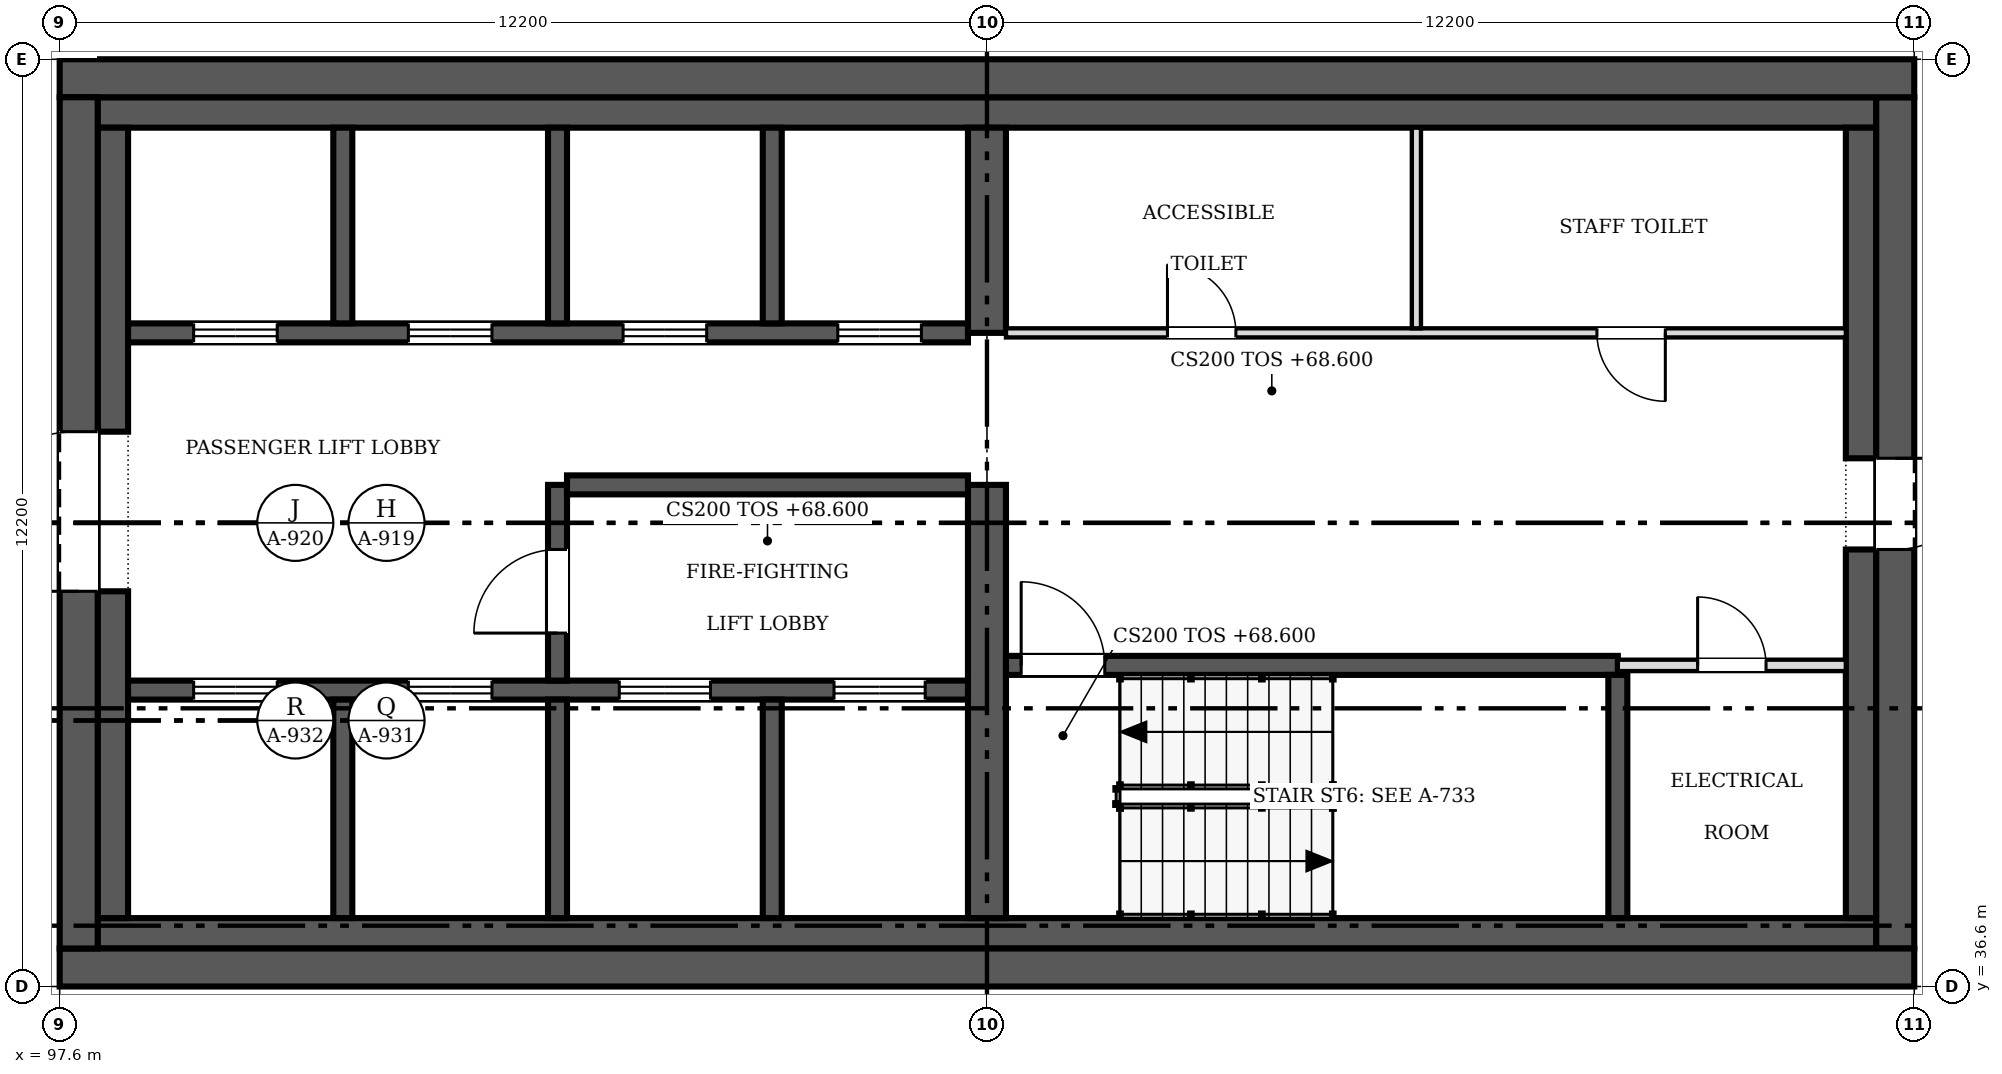
"""IFC4 building model, lengths in metres.
Left out: names, types, materials, properties, quantities, classifications, styles, units other than length and angle.
Written with IfcOpenShell. Run it as: python <this file> out.ifc"""

import sys

from ifc_helpers import new_model, si_unit, direction, frame, frame_2d, origin, place, context, subcontext, project, spatial, rectangle, extrude, source, transform, mapped, element, fill, save


model = new_model("IFC4")
c1 = context("Model", 3, precision=1e-05, world=origin(), true_north=direction((0.0, 1.0)))
c2 = subcontext(c1, "Body", "Model", "MODEL_VIEW")
j1 = project(units=[si_unit("LENGTHUNIT", "METRE"), si_unit("PLANEANGLEUNIT", "RADIAN")], contexts=[c1])
p1 = place(None, origin())
s1 = spatial("IfcSite", under=j1, at=p1, CompositionType="ELEMENT")
p2 = place(p1, origin())
s2 = spatial("IfcBuilding", under=s1, at=p2, CompositionType="ELEMENT")
p3 = place(p2, frame((0.0, 0.0, 68.6)))
s3 = spatial("IfcBuildingStorey", under=s2, at=p3, CompositionType="ELEMENT", Elevation=68.6)
p4 = place(p3, frame((122.0, 36.85, 0.0), z_axis=(0.0, 0.0, 1.0), x_axis=(-1.0, 0.0, 0.0)))
e1 = element("IfcWall", 1, at=p4, inside=s3, PredefinedType="SHEAR", context=c2, shape_type="SweptSolid", body=[
    extrude(rectangle(XDim=24.4, YDim=0.5, at=frame_2d((12.2, 0.0))), origin(), (0.0, 0.0, 1.0), 3.8),
])
p5 = place(p3, frame((97.85, 37.1, 0.0), z_axis=(0.0, 0.0, 1.0), x_axis=(0.0, 1.0, 0.0)))
e2 = element("IfcWall", 2, at=p5, inside=s3, PredefinedType="SHEAR", context=c2, shape_type="SweptSolid", body=[
    extrude(rectangle(XDim=11.2, YDim=0.5, at=frame_2d((5.6, 0.0))), origin(), (0.0, 0.0, 1.0), 3.8),
])
m1 = source(origin(), c2, "Body", "SweptSolid", [
    extrude(rectangle(XDim=2.1, YDim=2.4, at=frame_2d((1.05, 1.2))), frame((0.0, 0.26, 0.0), z_axis=(0.0, -1.0, 0.0), x_axis=(1.0, 0.0, 0.0)), (0.0, 0.0, 1.0), 0.52),
])
p6 = place(p5, frame((4.7, 0.0, 0.0)))
e3 = element("IfcOpeningElement", 3, at=p6, cuts=e2, PredefinedType="OPENING", context=c2, shape_type="MappedRepresentation", body=[
    mapped(m1, transform((0.0, 0.0, 0.0), scale=1.0)),
])
p7 = place(p3, frame((97.6, 48.55, 0.0), z_axis=(0.0, 0.0, 1.0), x_axis=(1.0, 0.0, 0.0)))
e4 = element("IfcWall", 4, at=p7, inside=s3, PredefinedType="SHEAR", context=c2, shape_type="SweptSolid", body=[
    extrude(rectangle(XDim=24.4, YDim=0.5, at=frame_2d((12.2, 0.0))), origin(), (0.0, 0.0, 1.0), 3.8),
])
p8 = place(p3, frame((121.75, 48.3, 0.0), z_axis=(0.0, 0.0, 1.0), x_axis=(0.0, -1.0, 0.0)))
e5 = element("IfcWall", 5, at=p8, inside=s3, PredefinedType="SHEAR", context=c2, shape_type="SweptSolid", body=[
    extrude(rectangle(XDim=11.2, YDim=0.5, at=frame_2d((5.6, 0.0))), origin(), (0.0, 0.0, 1.0), 3.8),
])
m2 = source(origin(), c2, "Body", "SweptSolid", [
    extrude(rectangle(XDim=1.2, YDim=2.1, at=frame_2d((0.6, 1.05))), frame((0.0, 0.26, 0.0), z_axis=(0.0, -1.0, 0.0), x_axis=(1.0, 0.0, 0.0)), (0.0, 0.0, 1.0), 0.52),
])
p9 = place(p8, frame((4.75, 0.0, 0.0)))
e6 = element("IfcOpeningElement", 6, at=p9, cuts=e5, PredefinedType="OPENING", context=c2, shape_type="MappedRepresentation", body=[
    mapped(m2, transform((0.0, 0.0, 0.0), scale=1.0)),
])
for number, where, z_axis, x_axis in (
    (7, (98.1, 37.3, 0.0), (0.0, 0.0, 1.0), (1.0, 0.0, 0.0)),
    (8, (98.1, 48.1, 0.0), (0.0, 0.0, 1.0), (1.0, 0.0, 0.0)),
):
    element("IfcWall", number, at=place(p3, frame(where, z_axis=z_axis, x_axis=x_axis)), inside=s3, PredefinedType="SOLIDWALL", context=c2, shape_type="SweptSolid", body=[
        extrude(rectangle(XDim=23.4, YDim=0.4, at=frame_2d((11.7, 0.0))), origin(), (0.0, 0.0, 1.0), 3.8),
    ])
p10 = place(p3, frame((98.3, 37.5, 0.0), z_axis=(0.0, 0.0, 1.0), x_axis=(0.0, 1.0, 0.0)))
e9 = element("IfcWall", 9, at=p10, inside=s3, PredefinedType="SOLIDWALL", context=c2, shape_type="SweptSolid", body=[
    extrude(rectangle(XDim=4.3, YDim=0.4, at=frame_2d((2.15, 0.0))), origin(), (0.0, 0.0, 1.0), 3.8),
])
p11 = place(p3, frame((98.3, 43.9, 0.0), z_axis=(0.0, 0.0, 1.0), x_axis=(0.0, 1.0, 0.0)))
e10 = element("IfcWall", 10, at=p11, inside=s3, PredefinedType="SOLIDWALL", context=c2, shape_type="SweptSolid", body=[
    extrude(rectangle(XDim=4.0, YDim=0.4, at=frame_2d((2.0, 0.0))), origin(), (0.0, 0.0, 1.0), 3.8),
])
p12 = place(p3, frame((121.3, 37.5, 0.0), z_axis=(0.0, 0.0, 1.0), x_axis=(0.0, 1.0, 0.0)))
e11 = element("IfcWall", 11, at=p12, inside=s3, PredefinedType="SOLIDWALL", context=c2, shape_type="SweptSolid", body=[
    extrude(rectangle(XDim=4.85, YDim=0.4, at=frame_2d((2.425, 0.0))), origin(), (0.0, 0.0, 1.0), 3.8),
])
p13 = place(p3, frame((121.3, 43.55, 0.0), z_axis=(0.0, 0.0, 1.0), x_axis=(0.0, 1.0, 0.0)))
e12 = element("IfcWall", 12, at=p13, inside=s3, PredefinedType="SOLIDWALL", context=c2, shape_type="SweptSolid", body=[
    extrude(rectangle(XDim=4.35, YDim=0.4, at=frame_2d((2.175, 0.0))), origin(), (0.0, 0.0, 1.0), 3.8),
])
p14 = place(p3, frame((109.8, 37.5, 0.0), z_axis=(0.0, 0.0, 1.0), x_axis=(0.0, 1.0, 0.0)))
e13 = element("IfcWall", 13, at=p14, inside=s3, PredefinedType="SHEAR", context=c2, shape_type="SweptSolid", body=[
    extrude(rectangle(XDim=5.7, YDim=0.5, at=frame_2d((2.85, 0.0))), origin(), (0.0, 0.0, 1.0), 3.8),
])
p15 = place(p3, frame((109.8, 45.2, 0.0), z_axis=(0.0, 0.0, 1.0), x_axis=(0.0, 1.0, 0.0)))
e14 = element("IfcWall", 14, at=p15, inside=s3, PredefinedType="SHEAR", context=c2, shape_type="SweptSolid", body=[
    extrude(rectangle(XDim=2.7, YDim=0.5, at=frame_2d((1.35, 0.0))), origin(), (0.0, 0.0, 1.0), 3.8),
])
p16 = place(p3, frame((98.5, 40.5, 0.0), z_axis=(0.0, 0.0, 1.0), x_axis=(1.0, 0.0, 0.0)))
e15 = element("IfcWall", 15, at=p16, inside=s3, PredefinedType="SOLIDWALL", context=c2, shape_type="SweptSolid", body=[
    extrude(rectangle(XDim=11.05, YDim=0.25, at=frame_2d((5.525, 0.0))), origin(), (0.0, 0.0, 1.0), 3.8),
])
m3 = source(origin(), c2, "Body", "SweptSolid", [
    extrude(rectangle(XDim=1.1, YDim=2.1, at=frame_2d((0.55, 1.05))), frame((0.0, 0.135, 0.0), z_axis=(0.0, -1.0, 0.0), x_axis=(1.0, 0.0, 0.0)), (0.0, 0.0, 1.0), 0.27),
])
p17 = place(p16, frame((0.863, 0.0, 0.0)))
e16 = element("IfcOpeningElement", 16, at=p17, cuts=e15, PredefinedType="OPENING", context=c2, shape_type="MappedRepresentation", body=[
    mapped(m3, transform((0.0, 0.0, 0.0), scale=1.0)),
])
p18 = place(p16, frame((3.688, 0.0, 0.0)))
e17 = element("IfcOpeningElement", 17, at=p18, cuts=e15, PredefinedType="OPENING", context=c2, shape_type="MappedRepresentation", body=[
    mapped(m3, transform((0.0, 0.0, 0.0), scale=1.0)),
])
m4 = source(origin(), c2, "Body", "SweptSolid", [
    extrude(rectangle(XDim=1.2, YDim=2.1, at=frame_2d((0.6, 1.05))), frame((0.0, 0.135, 0.0), z_axis=(0.0, -1.0, 0.0), x_axis=(1.0, 0.0, 0.0)), (0.0, 0.0, 1.0), 0.27),
])
p19 = place(p16, frame((6.462, 0.0, 0.0)))
e18 = element("IfcOpeningElement", 18, at=p19, cuts=e15, PredefinedType="OPENING", context=c2, shape_type="MappedRepresentation", body=[
    mapped(m4, transform((0.0, 0.0, 0.0), scale=1.0)),
])
p20 = place(p16, frame((9.288, 0.0, 0.0)))
e19 = element("IfcOpeningElement", 19, at=p20, cuts=e15, PredefinedType="OPENING", context=c2, shape_type="MappedRepresentation", body=[
    mapped(m4, transform((0.0, 0.0, 0.0), scale=1.0)),
])
p21 = place(p3, frame((109.55, 45.2, 0.0), z_axis=(0.0, 0.0, 1.0), x_axis=(-1.0, 0.0, 0.0)))
e20 = element("IfcWall", 20, at=p21, inside=s3, PredefinedType="SOLIDWALL", context=c2, shape_type="SweptSolid", body=[
    extrude(rectangle(XDim=11.05, YDim=0.25, at=frame_2d((5.525, 0.0))), origin(), (0.0, 0.0, 1.0), 3.8),
])
p22 = place(p21, frame((9.087, 0.0, 0.0)))
e21 = element("IfcOpeningElement", 21, at=p22, cuts=e20, PredefinedType="OPENING", context=c2, shape_type="MappedRepresentation", body=[
    mapped(m3, transform((0.0, 0.0, 0.0), scale=1.0)),
])
p23 = place(p21, frame((6.262, 0.0, 0.0)))
e22 = element("IfcOpeningElement", 22, at=p23, cuts=e20, PredefinedType="OPENING", context=c2, shape_type="MappedRepresentation", body=[
    mapped(m3, transform((0.0, 0.0, 0.0), scale=1.0)),
])
p24 = place(p21, frame((3.438, 0.0, 0.0)))
e23 = element("IfcOpeningElement", 23, at=p24, cuts=e20, PredefinedType="OPENING", context=c2, shape_type="MappedRepresentation", body=[
    mapped(m3, transform((0.0, 0.0, 0.0), scale=1.0)),
])
p25 = place(p21, frame((0.613, 0.0, 0.0)))
e24 = element("IfcOpeningElement", 24, at=p25, cuts=e20, PredefinedType="OPENING", context=c2, shape_type="MappedRepresentation", body=[
    mapped(m3, transform((0.0, 0.0, 0.0), scale=1.0)),
])
p26 = place(p3, frame((118.1, 40.825, 0.0), z_axis=(0.0, 0.0, 1.0), x_axis=(-1.0, 0.0, 0.0)))
e25 = element("IfcWall", 25, at=p26, inside=s3, PredefinedType="SOLIDWALL", context=c2, shape_type="SweptSolid", body=[
    extrude(rectangle(XDim=8.05, YDim=0.25, at=frame_2d((4.025, 0.0))), origin(), (0.0, 0.0, 1.0), 3.8),
])
p27 = place(p26, frame((6.75, 0.0, 0.0)))
e26 = element("IfcOpeningElement", 26, at=p27, cuts=e25, PredefinedType="OPENING", context=c2, shape_type="MappedRepresentation", body=[
    mapped(m3, transform((0.0, 0.0, 0.0), scale=1.0)),
])
p28 = place(p3, frame((104.15, 37.5, 0.0), z_axis=(0.0, 0.0, 1.0), x_axis=(0.0, 1.0, 0.0)))
e27 = element("IfcWall", 27, at=p28, inside=s3, PredefinedType="SOLIDWALL", context=c2, shape_type="SweptSolid", body=[
    extrude(rectangle(XDim=2.875, YDim=0.25, at=frame_2d((1.438, 0.0))), origin(), (0.0, 0.0, 1.0), 3.8),
])
p29 = place(p3, frame((104.15, 43.2, 0.0), z_axis=(0.0, 0.0, 1.0), x_axis=(0.0, -1.0, 0.0)))
e28 = element("IfcWall", 28, at=p29, inside=s3, PredefinedType="SOLIDWALL", context=c2, shape_type="SweptSolid", body=[
    extrude(rectangle(XDim=2.575, YDim=0.25, at=frame_2d((1.288, 0.0))), origin(), (0.0, 0.0, 1.0), 3.8),
])
p30 = place(p29, frame((0.85, 0.0, 0.0)))
e29 = element("IfcOpeningElement", 29, at=p30, cuts=e28, PredefinedType="OPENING", context=c2, shape_type="MappedRepresentation", body=[
    mapped(m3, transform((0.0, 0.0, 0.0), scale=1.0)),
])
p31 = place(p3, frame((104.275, 43.2, 0.0), z_axis=(0.0, 0.0, 1.0), x_axis=(1.0, 0.0, 0.0)))
e30 = element("IfcWall", 30, at=p31, inside=s3, PredefinedType="SOLIDWALL", context=c2, shape_type="SweptSolid", body=[
    extrude(rectangle(XDim=5.275, YDim=0.25, at=frame_2d((2.638, 0.0))), origin(), (0.0, 0.0, 1.0), 3.8),
])
p32 = place(p3, frame((118.1, 37.5, 0.0), z_axis=(0.0, 0.0, 1.0), x_axis=(0.0, 1.0, 0.0)))
e31 = element("IfcWall", 31, at=p32, inside=s3, PredefinedType="SOLIDWALL", context=c2, shape_type="SweptSolid", body=[
    extrude(rectangle(XDim=3.2, YDim=0.25, at=frame_2d((1.6, 0.0))), origin(), (0.0, 0.0, 1.0), 3.8),
])
for number, where, z_axis, x_axis in (
    (32, (101.325, 37.5, 0.0), (0.0, 0.0, 1.0), (0.0, 1.0, 0.0)),
    (33, (106.975, 37.5, 0.0), (0.0, 0.0, 1.0), (0.0, 1.0, 0.0)),
):
    element("IfcWall", number, at=place(p3, frame(where, z_axis=z_axis, x_axis=x_axis)), inside=s3, PredefinedType="SOLIDWALL", context=c2, shape_type="SweptSolid", body=[
        extrude(rectangle(XDim=2.875, YDim=0.25, at=frame_2d((1.438, 0.0))), origin(), (0.0, 0.0, 1.0), 3.8),
    ])
for number, where, z_axis, x_axis in (
    (34, (101.325, 45.325, 0.0), (0.0, 0.0, 1.0), (0.0, 1.0, 0.0)),
    (35, (104.15, 45.325, 0.0), (0.0, 0.0, 1.0), (0.0, 1.0, 0.0)),
    (36, (106.975, 45.325, 0.0), (0.0, 0.0, 1.0), (0.0, 1.0, 0.0)),
):
    element("IfcWall", number, at=place(p3, frame(where, z_axis=z_axis, x_axis=x_axis)), inside=s3, PredefinedType="SOLIDWALL", context=c2, shape_type="SweptSolid", body=[
        extrude(rectangle(XDim=2.575, YDim=0.25, at=frame_2d((1.288, 0.0))), origin(), (0.0, 0.0, 1.0), 3.8),
    ])
p33 = place(p3, frame((110.05, 45.2, 0.0), z_axis=(0.0, 0.0, 1.0), x_axis=(1.0, 0.0, 0.0)))
e37 = element("IfcWall", 37, at=p33, inside=s3, PredefinedType="PARTITIONING", context=c2, shape_type="SweptSolid", body=[
    extrude(rectangle(XDim=11.05, YDim=0.12, at=frame_2d((5.525, 0.0))), origin(), (0.0, 0.0, 1.0), 3.6),
])
m5 = source(origin(), c2, "Body", "SweptSolid", [
    extrude(rectangle(XDim=0.9, YDim=2.1, at=frame_2d((0.45, 1.05))), frame((0.0, 0.07, 0.0), z_axis=(0.0, -1.0, 0.0), x_axis=(1.0, 0.0, 0.0)), (0.0, 0.0, 1.0), 0.14),
])
p34 = place(p33, frame((2.125, 0.0, 0.0)))
e38 = element("IfcOpeningElement", 38, at=p34, cuts=e37, PredefinedType="OPENING", context=c2, shape_type="MappedRepresentation", body=[
    mapped(m5, transform((0.0, 0.0, 0.0), scale=1.0)),
])
p35 = place(p33, frame((7.775, 0.0, 0.0)))
e39 = element("IfcOpeningElement", 39, at=p35, cuts=e37, PredefinedType="OPENING", context=c2, shape_type="MappedRepresentation", body=[
    mapped(m5, transform((0.0, 0.0, 0.0), scale=1.0)),
])
p36 = place(p3, frame((121.1, 40.825, 0.0), z_axis=(0.0, 0.0, 1.0), x_axis=(-1.0, 0.0, 0.0)))
e40 = element("IfcWall", 40, at=p36, inside=s3, PredefinedType="PARTITIONING", context=c2, shape_type="SweptSolid", body=[
    extrude(rectangle(XDim=3.0, YDim=0.15, at=frame_2d((1.5, 0.0))), origin(), (0.0, 0.0, 1.0), 3.6),
])
m6 = source(origin(), c2, "Body", "SweptSolid", [
    extrude(rectangle(XDim=0.9, YDim=2.1, at=frame_2d((0.45, 1.05))), frame((0.0, 0.085, 0.0), z_axis=(0.0, -1.0, 0.0), x_axis=(1.0, 0.0, 0.0)), (0.0, 0.0, 1.0), 0.17),
])
p37 = place(p36, frame((1.05, 0.0, 0.0)))
e41 = element("IfcOpeningElement", 41, at=p37, cuts=e40, PredefinedType="OPENING", context=c2, shape_type="MappedRepresentation", body=[
    mapped(m6, transform((0.0, 0.0, 0.0), scale=1.0)),
])
p38 = place(p3, frame((115.45, 45.26, 0.0), z_axis=(0.0, 0.0, 1.0), x_axis=(0.0, 1.0, 0.0)))
e42 = element("IfcWall", 42, at=p38, inside=s3, PredefinedType="PARTITIONING", context=c2, shape_type="SweptSolid", body=[
    extrude(rectangle(XDim=2.64, YDim=0.12, at=frame_2d((1.32, 0.0))), origin(), (0.0, 0.0, 1.0), 3.6),
])
m7 = source(origin(), c2, "Body", "SweptSolid", [
    extrude(rectangle(XDim=2.1, YDim=2.4, at=frame_2d((1.05, 1.2))), frame((0.0, 0.025, 0.0), z_axis=(0.0, -1.0, 0.0), x_axis=(1.0, 0.0, 0.0)), (0.0, 0.0, 1.0), 0.05),
])
p39 = place(p6, origin())
e43 = element("IfcDoor", 43, at=p39, inside=s3, OperationType="DOUBLE_DOOR_SINGLE_SWING", PredefinedType="DOOR", context=c2, shape_type="MappedRepresentation", body=[
    mapped(m7, transform((0.0, 0.0, 0.0), scale=1.0)),
])
fill(e3, e43)
m8 = source(origin(), c2, "Body", "SweptSolid", [
    extrude(rectangle(XDim=1.2, YDim=2.1, at=frame_2d((0.6, 1.05))), frame((0.0, 0.025, 0.0), z_axis=(0.0, -1.0, 0.0), x_axis=(1.0, 0.0, 0.0)), (0.0, 0.0, 1.0), 0.05),
])
p40 = place(p9, origin())
e44 = element("IfcDoor", 44, at=p40, inside=s3, OperationType="SINGLE_SWING_LEFT", PredefinedType="DOOR", context=c2, shape_type="MappedRepresentation", body=[
    mapped(m8, transform((0.0, 0.0, 0.0), scale=1.0)),
])
fill(e6, e44)
m9 = source(origin(), c2, "Body", "SweptSolid", [
    extrude(rectangle(XDim=1.1, YDim=2.1, at=frame_2d((0.55, 1.05))), frame((0.0, 0.025, 0.0), z_axis=(0.0, -1.0, 0.0), x_axis=(1.0, 0.0, 0.0)), (0.0, 0.0, 1.0), 0.05),
])
p41 = place(p17, origin())
e45 = element("IfcDoor", 45, at=p41, inside=s3, OperationType="DOUBLE_DOOR_SLIDING", PredefinedType="DOOR", context=c2, shape_type="MappedRepresentation", body=[
    mapped(m9, transform((0.0, 0.0, 0.0), scale=1.0)),
])
fill(e16, e45)
p42 = place(p18, origin())
e46 = element("IfcDoor", 46, at=p42, inside=s3, OperationType="DOUBLE_DOOR_SLIDING", PredefinedType="DOOR", context=c2, shape_type="MappedRepresentation", body=[
    mapped(m9, transform((0.0, 0.0, 0.0), scale=1.0)),
])
fill(e17, e46)
p43 = place(p19, origin())
e47 = element("IfcDoor", 47, at=p43, inside=s3, OperationType="DOUBLE_DOOR_SLIDING", PredefinedType="DOOR", context=c2, shape_type="MappedRepresentation", body=[
    mapped(m8, transform((0.0, 0.0, 0.0), scale=1.0)),
])
fill(e18, e47)
p44 = place(p20, origin())
e48 = element("IfcDoor", 48, at=p44, inside=s3, OperationType="DOUBLE_DOOR_SLIDING", PredefinedType="DOOR", context=c2, shape_type="MappedRepresentation", body=[
    mapped(m8, transform((0.0, 0.0, 0.0), scale=1.0)),
])
fill(e19, e48)
p45 = place(p22, origin())
e49 = element("IfcDoor", 49, at=p45, inside=s3, OperationType="DOUBLE_DOOR_SLIDING", PredefinedType="DOOR", context=c2, shape_type="MappedRepresentation", body=[
    mapped(m9, transform((0.0, 0.0, 0.0), scale=1.0)),
])
fill(e21, e49)
p46 = place(p23, origin())
e50 = element("IfcDoor", 50, at=p46, inside=s3, OperationType="DOUBLE_DOOR_SLIDING", PredefinedType="DOOR", context=c2, shape_type="MappedRepresentation", body=[
    mapped(m9, transform((0.0, 0.0, 0.0), scale=1.0)),
])
fill(e22, e50)
p47 = place(p24, origin())
e51 = element("IfcDoor", 51, at=p47, inside=s3, OperationType="DOUBLE_DOOR_SLIDING", PredefinedType="DOOR", context=c2, shape_type="MappedRepresentation", body=[
    mapped(m9, transform((0.0, 0.0, 0.0), scale=1.0)),
])
fill(e23, e51)
p48 = place(p25, origin())
e52 = element("IfcDoor", 52, at=p48, inside=s3, OperationType="DOUBLE_DOOR_SLIDING", PredefinedType="DOOR", context=c2, shape_type="MappedRepresentation", body=[
    mapped(m9, transform((0.0, 0.0, 0.0), scale=1.0)),
])
fill(e24, e52)
p49 = place(p27, origin())
e53 = element("IfcDoor", 53, at=p49, inside=s3, OperationType="SINGLE_SWING_RIGHT", PredefinedType="DOOR", context=c2, shape_type="MappedRepresentation", body=[
    mapped(m9, transform((0.0, 0.0, 0.0), scale=1.0)),
])
fill(e26, e53)
p50 = place(p30, origin())
e54 = element("IfcDoor", 54, at=p50, inside=s3, OperationType="SINGLE_SWING_RIGHT", PredefinedType="DOOR", context=c2, shape_type="MappedRepresentation", body=[
    mapped(m9, transform((0.0, 0.0, 0.0), scale=1.0)),
])
fill(e29, e54)
m10 = source(origin(), c2, "Body", "SweptSolid", [
    extrude(rectangle(XDim=0.9, YDim=2.1, at=frame_2d((0.45, 1.05))), frame((0.0, 0.025, 0.0), z_axis=(0.0, -1.0, 0.0), x_axis=(1.0, 0.0, 0.0)), (0.0, 0.0, 1.0), 0.05),
])
p51 = place(p34, origin())
e55 = element("IfcDoor", 55, at=p51, inside=s3, OperationType="SINGLE_SWING_LEFT", PredefinedType="DOOR", context=c2, shape_type="MappedRepresentation", body=[
    mapped(m10, transform((0.0, 0.0, 0.0), scale=1.0)),
])
fill(e38, e55)
p52 = place(p35, origin())
e56 = element("IfcDoor", 56, at=p52, inside=s3, OperationType="SINGLE_SWING_RIGHT", PredefinedType="DOOR", context=c2, shape_type="MappedRepresentation", body=[
    mapped(m10, transform((0.0, 0.0, 0.0), scale=1.0)),
])
fill(e39, e56)
p53 = place(p37, origin())
e57 = element("IfcDoor", 57, at=p53, inside=s3, OperationType="SINGLE_SWING_RIGHT", PredefinedType="DOOR", context=c2, shape_type="MappedRepresentation", body=[
    mapped(m10, transform((0.0, 0.0, 0.0), scale=1.0)),
])
fill(e41, e57)
save(model, sys.argv[1])
